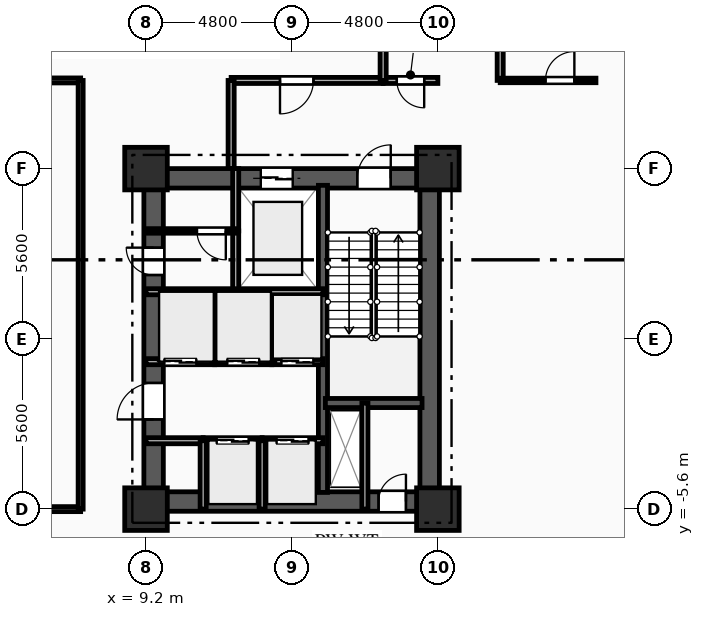
"""IFC4 building model, lengths in metres.
Left out: names, types, materials, properties, quantities, classifications, styles, units other than length and angle.
Written with IfcOpenShell. Run it as: python <this file> out.ifc"""

import sys

from ifc_helpers import new_model, si_unit, direction, frame, frame_2d, origin, origin_2d, place, context, subcontext, project, spatial, rectangle, extrude, element, fill, save


model = new_model("IFC4")
c1 = context("Model", 3, precision=1e-05, world=origin(), true_north=direction((0.0, 1.0)))
c2 = subcontext(c1, "Body", "Model", "MODEL_VIEW")
j1 = project(units=[si_unit("LENGTHUNIT", "METRE"), si_unit("PLANEANGLEUNIT", "RADIAN")], contexts=[c1])
p1 = place(None, origin())
s1 = spatial("IfcSite", under=j1, at=p1, CompositionType="ELEMENT")
p2 = place(p1, origin())
s2 = spatial("IfcBuilding", under=s1, at=p2, CompositionType="ELEMENT")
p3 = place(p2, origin())
s3 = spatial("IfcBuildingStorey", under=s2, at=p3, CompositionType="ELEMENT", Elevation=0.0)
for number, where, z_axis, x_axis in (
    (1, (9.2, -5.6, 0.0), (0.0, 0.0, 1.0), (1.0, 0.0, 0.0)),
    (2, (9.2, 5.6, 0.0), (0.0, 0.0, 1.0), (1.0, 0.0, 0.0)),
    (3, (18.8, -5.6, 0.0), (0.0, 0.0, 1.0), (1.0, 0.0, 0.0)),
    (4, (18.8, 5.6, 0.0), (0.0, 0.0, 1.0), (1.0, 0.0, 0.0)),
):
    element("IfcColumn", number, at=place(p3, frame(where, z_axis=z_axis, x_axis=x_axis)), inside=s3, PredefinedType="COLUMN", context=c2, shape_type="SweptSolid", body=[
        extrude(rectangle(XDim=1.4, YDim=1.4, at=origin_2d()), origin(), (0.0, 0.0, 1.0), 4.5),
    ])
p4 = place(p3, frame((9.2, 5.28, 0.0), z_axis=(0.0, 0.0, 1.0), x_axis=(1.0, 0.0, 0.0)))
e5 = element("IfcWall", 5, at=p4, inside=s3, PredefinedType="SHEAR", context=c2, shape_type="SweptSolid", body=[
    extrude(rectangle(XDim=9.6, YDim=0.64, at=frame_2d((4.8, 0.0))), origin(), (0.0, 0.0, 1.0), 4.17),
])
p5 = place(p4, frame((6.95, 0.0, 0.0)))
e6 = element("IfcOpeningElement", 6, at=p5, cuts=e5, PredefinedType="OPENING", context=c2, shape_type="SweptSolid", body=[
    extrude(rectangle(XDim=1.1, YDim=2.15, at=frame_2d((0.55, 1.075))), frame((0.0, 0.33, 0.0), z_axis=(0.0, -1.0, 0.0), x_axis=(1.0, 0.0, 0.0)), (0.0, 0.0, 1.0), 0.66),
])
p6 = place(p4, frame((3.775, 0.0, 0.0)))
e7 = element("IfcOpeningElement", 7, at=p6, cuts=e5, PredefinedType="OPENING", context=c2, shape_type="SweptSolid", body=[
    extrude(rectangle(XDim=1.05, YDim=2.1, at=frame_2d((0.525, 1.05))), frame((0.0, 0.33, 0.0), z_axis=(0.0, -1.0, 0.0), x_axis=(1.0, 0.0, 0.0)), (0.0, 0.0, 1.0), 0.66),
])
p7 = place(p3, frame((9.2, -5.35, 0.0), z_axis=(0.0, 0.0, 1.0), x_axis=(1.0, 0.0, 0.0)))
e8 = element("IfcWall", 8, at=p7, inside=s3, PredefinedType="SHEAR", context=c2, shape_type="SweptSolid", body=[
    extrude(rectangle(XDim=9.6, YDim=0.64, at=frame_2d((4.8, 0.0))), origin(), (0.0, 0.0, 1.0), 4.17),
])
p8 = place(p7, frame((7.65, 0.0, 0.0)))
e9 = element("IfcOpeningElement", 9, at=p8, cuts=e8, PredefinedType="OPENING", context=c2, shape_type="SweptSolid", body=[
    extrude(rectangle(XDim=0.9, YDim=2.1, at=frame_2d((0.45, 1.05))), frame((0.0, 0.33, 0.0), z_axis=(0.0, -1.0, 0.0), x_axis=(1.0, 0.0, 0.0)), (0.0, 0.0, 1.0), 0.66),
])
p9 = place(p3, frame((9.45, -5.05, 0.0), z_axis=(0.0, 0.0, 1.0), x_axis=(0.0, 1.0, 0.0)))
e10 = element("IfcWall", 10, at=p9, inside=s3, PredefinedType="SHEAR", context=c2, shape_type="SweptSolid", body=[
    extrude(rectangle(XDim=10.1, YDim=0.64, at=frame_2d((5.05, 0.0))), origin(), (0.0, 0.0, 1.0), 4.17),
])
p10 = place(p9, frame((7.15, 0.0, 0.0)))
e11 = element("IfcOpeningElement", 11, at=p10, cuts=e10, PredefinedType="OPENING", context=c2, shape_type="SweptSolid", body=[
    extrude(rectangle(XDim=0.9, YDim=2.1, at=frame_2d((0.45, 1.05))), frame((0.0, 0.33, 0.0), z_axis=(0.0, -1.0, 0.0), x_axis=(1.0, 0.0, 0.0)), (0.0, 0.0, 1.0), 0.66),
])
p11 = place(p9, frame((2.4, 0.0, 0.0)))
e12 = element("IfcOpeningElement", 12, at=p11, cuts=e10, PredefinedType="OPENING", context=c2, shape_type="SweptSolid", body=[
    extrude(rectangle(XDim=1.2, YDim=2.15, at=frame_2d((0.6, 1.075))), frame((0.0, 0.33, 0.0), z_axis=(0.0, -1.0, 0.0), x_axis=(1.0, 0.0, 0.0)), (0.0, 0.0, 1.0), 0.66),
])
p12 = place(p3, frame((18.53, -5.05, 0.0), z_axis=(0.0, 0.0, 1.0), x_axis=(0.0, 1.0, 0.0)))
e13 = element("IfcWall", 13, at=p12, inside=s3, PredefinedType="SHEAR", context=c2, shape_type="SweptSolid", body=[
    extrude(rectangle(XDim=10.1, YDim=0.64, at=frame_2d((5.05, 0.0))), origin(), (0.0, 0.0, 1.0), 4.17),
])
p13 = place(p3, frame((15.02, -5.05, 0.0), z_axis=(0.0, 0.0, 1.0), x_axis=(0.0, 1.0, 0.0)))
e14 = element("IfcWall", 14, at=p13, inside=s3, PredefinedType="SHEAR", context=c2, shape_type="SweptSolid", body=[
    extrude(rectangle(XDim=10.1, YDim=0.3, at=frame_2d((5.05, 0.0))), origin(), (0.0, 0.0, 1.0), 4.17),
])
p14 = place(p3, frame((15.1, -2.11, 0.0), z_axis=(0.0, 0.0, 1.0), x_axis=(1.0, 0.0, 0.0)))
e15 = element("IfcWall", 15, at=p14, inside=s3, PredefinedType="SHEAR", context=c2, shape_type="SweptSolid", body=[
    extrude(rectangle(XDim=3.18, YDim=0.3, at=frame_2d((1.59, 0.0))), origin(), (0.0, 0.0, 1.0), 4.17),
])
p15 = place(p3, frame((16.4, -2.11, 0.0), z_axis=(0.0, 0.0, 1.0), x_axis=(0.0, -1.0, 0.0)))
e16 = element("IfcWall", 16, at=p15, inside=s3, PredefinedType="PARTITIONING", context=c2, shape_type="SweptSolid", body=[
    extrude(rectangle(XDim=3.49, YDim=0.2, at=frame_2d((1.745, 0.0))), origin(), (0.0, 0.0, 1.0), 4.17),
])
p16 = place(p3, frame((12.15, 3.55, 0.0), z_axis=(0.0, 0.0, 1.0), x_axis=(0.0, -1.0, 0.0)))
e17 = element("IfcWall", 17, at=p16, inside=s3, PredefinedType="PARTITIONING", context=c2, shape_type="SweptSolid", body=[
    extrude(rectangle(XDim=2.0, YDim=0.2, at=frame_2d((1.0, 0.0))), origin(), (0.0, 0.0, 1.0), 4.17),
])
p17 = place(p3, frame((12.15, 5.6, 0.0), z_axis=(0.0, 0.0, 1.0), x_axis=(0.0, -1.0, 0.0)))
e18 = element("IfcWall", 18, at=p17, inside=s3, PredefinedType="PARTITIONING", context=c2, shape_type="SweptSolid", body=[
    extrude(rectangle(XDim=2.05, YDim=0.2, at=frame_2d((1.025, 0.0))), origin(), (0.0, 0.0, 1.0), 4.17),
])
p18 = place(p3, frame((18.8, 8.5, 0.0), z_axis=(0.0, 0.0, 1.0), x_axis=(-1.0, 0.0, 0.0)))
e19 = element("IfcWall", 19, at=p18, inside=s3, PredefinedType="PARTITIONING", context=c2, shape_type="SweptSolid", body=[
    extrude(rectangle(XDim=1.8, YDim=0.2, at=frame_2d((0.9, 0.0))), origin(), (0.0, 0.0, 1.0), 4.17),
])
p19 = place(p18, frame((0.45, 0.0, 0.0)))
e20 = element("IfcOpeningElement", 20, at=p19, cuts=e19, PredefinedType="OPENING", context=c2, shape_type="SweptSolid", body=[
    extrude(rectangle(XDim=0.9, YDim=2.1, at=frame_2d((0.45, 1.05))), frame((0.0, 0.11, 0.0), z_axis=(0.0, -1.0, 0.0), x_axis=(1.0, 0.0, 0.0)), (0.0, 0.0, 1.0), 0.22),
])
p20 = place(p3, frame((17.0, 8.5, 0.0), z_axis=(0.0, 0.0, 1.0), x_axis=(-1.0, 0.0, 0.0)))
e21 = element("IfcWall", 21, at=p20, inside=s3, PredefinedType="PARTITIONING", context=c2, shape_type="SweptSolid", body=[
    extrude(rectangle(XDim=5.0, YDim=0.2, at=frame_2d((2.5, 0.0))), origin(), (0.0, 0.0, 1.0), 4.17),
])
p21 = place(p20, frame((2.292, 0.0, 0.0)))
e22 = element("IfcOpeningElement", 22, at=p21, cuts=e21, PredefinedType="OPENING", context=c2, shape_type="SweptSolid", body=[
    extrude(rectangle(XDim=1.1, YDim=2.15, at=frame_2d((0.55, 1.075))), frame((0.0, 0.11, 0.0), z_axis=(0.0, -1.0, 0.0), x_axis=(1.0, 0.0, 0.0)), (0.0, 0.0, 1.0), 0.22),
])
p22 = place(p3, frame((12.0, 8.5, 0.0), z_axis=(0.0, 0.0, 1.0), x_axis=(0.0, -1.0, 0.0)))
e23 = element("IfcWall", 23, at=p22, inside=s3, PredefinedType="PARTITIONING", context=c2, shape_type="SweptSolid", body=[
    extrude(rectangle(XDim=2.9, YDim=0.2, at=frame_2d((1.45, 0.0))), origin(), (0.0, 0.0, 1.0), 4.17),
])
p23 = place(p3, frame((12.15, 3.55, 0.0), z_axis=(0.0, 0.0, 1.0), x_axis=(-1.0, 0.0, 0.0)))
e24 = element("IfcWall", 24, at=p23, inside=s3, PredefinedType="PARTITIONING", context=c2, shape_type="SweptSolid", body=[
    extrude(rectangle(XDim=2.95, YDim=0.15, at=frame_2d((1.475, 0.0))), origin(), (0.0, 0.0, 1.0), 4.17),
])
p24 = place(p23, frame((0.325, 0.0, 0.0)))
e25 = element("IfcOpeningElement", 25, at=p24, cuts=e24, PredefinedType="OPENING", context=c2, shape_type="SweptSolid", body=[
    extrude(rectangle(XDim=0.95, YDim=2.1, at=frame_2d((0.475, 1.05))), frame((0.0, 0.085, 0.0), z_axis=(0.0, -1.0, 0.0), x_axis=(1.0, 0.0, 0.0)), (0.0, 0.0, 1.0), 0.17),
])
p25 = place(p3, frame((9.2, -3.35, 0.0), z_axis=(0.0, 0.0, 1.0), x_axis=(1.0, 0.0, 0.0)))
e26 = element("IfcWall", 26, at=p25, inside=s3, PredefinedType="PARTITIONING", context=c2, shape_type="SweptSolid", body=[
    extrude(rectangle(XDim=1.88, YDim=0.2, at=frame_2d((0.94, 0.0))), origin(), (0.0, 0.0, 1.0), 3.885),
])
p26 = place(p3, frame((11.08, -3.35, 0.0), z_axis=(0.0, 0.0, 1.0), x_axis=(1.0, 0.0, 0.0)))
e27 = element("IfcWall", 27, at=p26, inside=s3, PredefinedType="PARTITIONING", context=c2, shape_type="SweptSolid", body=[
    extrude(rectangle(XDim=1.94, YDim=0.2, at=frame_2d((0.97, 0.0))), origin(), (0.0, 0.0, 1.0), 4.17),
])
p27 = place(p26, frame((0.445, 0.0, 0.0)))
e28 = element("IfcOpeningElement", 28, at=p27, cuts=e27, PredefinedType="OPENING", context=c2, shape_type="SweptSolid", body=[
    extrude(rectangle(XDim=1.05, YDim=2.1, at=frame_2d((0.525, 1.05))), frame((0.0, 0.11, 0.0), z_axis=(0.0, -1.0, 0.0), x_axis=(1.0, 0.0, 0.0)), (0.0, 0.0, 1.0), 0.22),
])
p28 = place(p3, frame((13.02, -3.35, 0.0), z_axis=(0.0, 0.0, 1.0), x_axis=(1.0, 0.0, 0.0)))
e29 = element("IfcWall", 29, at=p28, inside=s3, PredefinedType="PARTITIONING", context=c2, shape_type="SweptSolid", body=[
    extrude(rectangle(XDim=2.0, YDim=0.2, at=frame_2d((1.0, 0.0))), origin(), (0.0, 0.0, 1.0), 4.17),
])
p29 = place(p28, frame((0.475, 0.0, 0.0)))
e30 = element("IfcOpeningElement", 30, at=p29, cuts=e29, PredefinedType="OPENING", context=c2, shape_type="SweptSolid", body=[
    extrude(rectangle(XDim=1.05, YDim=2.1, at=frame_2d((0.525, 1.05))), frame((0.0, 0.11, 0.0), z_axis=(0.0, -1.0, 0.0), x_axis=(1.0, 0.0, 0.0)), (0.0, 0.0, 1.0), 0.22),
])
p30 = place(p3, frame((11.46, -0.75, 0.0), z_axis=(0.0, 0.0, 1.0), x_axis=(-1.0, 0.0, 0.0)))
e31 = element("IfcWall", 31, at=p30, inside=s3, PredefinedType="PARTITIONING", context=c2, shape_type="SweptSolid", body=[
    extrude(rectangle(XDim=2.26, YDim=0.2, at=frame_2d((1.13, 0.0))), origin(), (0.0, 0.0, 1.0), 4.17),
])
p31 = place(p30, frame((0.605, 0.0, 0.0)))
e32 = element("IfcOpeningElement", 32, at=p31, cuts=e31, PredefinedType="OPENING", context=c2, shape_type="SweptSolid", body=[
    extrude(rectangle(XDim=1.05, YDim=2.1, at=frame_2d((0.525, 1.05))), frame((0.0, 0.11, 0.0), z_axis=(0.0, -1.0, 0.0), x_axis=(1.0, 0.0, 0.0)), (0.0, 0.0, 1.0), 0.22),
])
p32 = place(p3, frame((13.34, -0.75, 0.0), z_axis=(0.0, 0.0, 1.0), x_axis=(-1.0, 0.0, 0.0)))
e33 = element("IfcWall", 33, at=p32, inside=s3, PredefinedType="PARTITIONING", context=c2, shape_type="SweptSolid", body=[
    extrude(rectangle(XDim=1.88, YDim=0.2, at=frame_2d((0.94, 0.0))), origin(), (0.0, 0.0, 1.0), 4.17),
])
p33 = place(p32, frame((0.415, 0.0, 0.0)))
e34 = element("IfcOpeningElement", 34, at=p33, cuts=e33, PredefinedType="OPENING", context=c2, shape_type="SweptSolid", body=[
    extrude(rectangle(XDim=1.05, YDim=2.1, at=frame_2d((0.525, 1.05))), frame((0.0, 0.11, 0.0), z_axis=(0.0, -1.0, 0.0), x_axis=(1.0, 0.0, 0.0)), (0.0, 0.0, 1.0), 0.22),
])
p34 = place(p3, frame((15.02, -0.75, 0.0), z_axis=(0.0, 0.0, 1.0), x_axis=(-1.0, 0.0, 0.0)))
e35 = element("IfcWall", 35, at=p34, inside=s3, PredefinedType="PARTITIONING", context=c2, shape_type="SweptSolid", body=[
    extrude(rectangle(XDim=1.68, YDim=0.2, at=frame_2d((0.84, 0.0))), origin(), (0.0, 0.0, 1.0), 4.17),
])
p35 = place(p34, frame((0.315, 0.0, 0.0)))
e36 = element("IfcOpeningElement", 36, at=p35, cuts=e35, PredefinedType="OPENING", context=c2, shape_type="SweptSolid", body=[
    extrude(rectangle(XDim=1.05, YDim=2.1, at=frame_2d((0.525, 1.05))), frame((0.0, 0.11, 0.0), z_axis=(0.0, -1.0, 0.0), x_axis=(1.0, 0.0, 0.0)), (0.0, 0.0, 1.0), 0.22),
])
for number, where, z_axis, x_axis in (
    (37, (11.08, -5.6, 0.0), (0.0, 0.0, 1.0), (0.0, 1.0, 0.0)),
    (38, (13.02, -5.6, 0.0), (0.0, 0.0, 1.0), (0.0, 1.0, 0.0)),
):
    element("IfcWall", number, at=place(p3, frame(where, z_axis=z_axis, x_axis=x_axis)), inside=s3, PredefinedType="PARTITIONING", context=c2, shape_type="SweptSolid", body=[
        extrude(rectangle(XDim=2.25, YDim=0.2, at=frame_2d((1.125, 0.0))), origin(), (0.0, 0.0, 1.0), 4.17),
    ])
for number, where, z_axis, x_axis in (
    (39, (11.46, -0.75, 0.0), (0.0, 0.0, 1.0), (0.0, 1.0, 0.0)),
    (40, (13.34, -0.75, 0.0), (0.0, 0.0, 1.0), (0.0, 1.0, 0.0)),
):
    element("IfcWall", number, at=place(p3, frame(where, z_axis=z_axis, x_axis=x_axis)), inside=s3, PredefinedType="PARTITIONING", context=c2, shape_type="SweptSolid", body=[
        extrude(rectangle(XDim=2.3, YDim=0.2, at=frame_2d((1.15, 0.0))), origin(), (0.0, 0.0, 1.0), 4.17),
    ])
p36 = place(p3, frame((17.0, 8.5, 0.0), z_axis=(0.0, 0.0, 1.0), x_axis=(0.0, 1.0, 0.0)))
e41 = element("IfcWall", 41, at=p36, inside=s3, PredefinedType="PARTITIONING", context=c2, shape_type="SweptSolid", body=[
    extrude(rectangle(XDim=2.15, YDim=0.2, at=frame_2d((1.075, 0.0))), origin(), (0.0, 0.0, 1.0), 4.17),
])
p37 = place(p3, frame((20.85, 24.8, 0.0), z_axis=(0.0, 0.0, 1.0), x_axis=(0.0, -1.0, 0.0)))
e42 = element("IfcWall", 42, at=p37, inside=s3, PredefinedType="PARTITIONING", context=c2, shape_type="SweptSolid", body=[
    extrude(rectangle(XDim=16.3, YDim=0.2, at=frame_2d((8.15, 0.0))), origin(), (0.0, 0.0, 1.0), 4.17),
])
p38 = place(p3, frame((7.05, 8.5, 0.0), z_axis=(0.0, 0.0, 1.0), x_axis=(-1.0, 0.0, 0.0)))
e43 = element("IfcWall", 43, at=p38, inside=s3, PredefinedType="PARTITIONING", context=c2, shape_type="SweptSolid", body=[
    extrude(rectangle(XDim=7.05, YDim=0.165, at=frame_2d((3.525, 0.0))), origin(), (0.0, 0.0, 1.0), 4.17),
])
p39 = place(p3, frame((0.0, -5.6, 0.0), z_axis=(0.0, 0.0, 1.0), x_axis=(1.0, 0.0, 0.0)))
e44 = element("IfcWall", 44, at=p39, inside=s3, PredefinedType="PARTITIONING", context=c2, shape_type="SweptSolid", body=[
    extrude(rectangle(XDim=7.05, YDim=0.165, at=frame_2d((3.525, 0.0))), origin(), (0.0, 0.0, 1.0), 3.655),
])
p40 = place(p3, frame((7.05, -5.6, 0.0), z_axis=(0.0, 0.0, 1.0), x_axis=(0.0, 1.0, 0.0)))
e45 = element("IfcWall", 45, at=p40, inside=s3, PredefinedType="PARTITIONING", context=c2, shape_type="SweptSolid", body=[
    extrude(rectangle(XDim=14.1, YDim=0.165, at=frame_2d((7.05, 0.0))), origin(), (0.0, 0.0, 1.0), 4.17),
])
p41 = place(p3, frame((20.85, 8.5, 0.0), z_axis=(0.0, 0.0, 1.0), x_axis=(1.0, 0.0, 0.0)))
e46 = element("IfcWall", 46, at=p41, inside=s3, PredefinedType="PARTITIONING", context=c2, shape_type="SweptSolid", body=[
    extrude(rectangle(XDim=3.15, YDim=0.15, at=frame_2d((1.575, 0.0))), origin(), (0.0, 0.0, 1.0), 4.17),
])
p42 = place(p41, frame((1.49, 0.0, 0.0)))
e47 = element("IfcOpeningElement", 47, at=p42, cuts=e46, PredefinedType="OPENING", context=c2, shape_type="SweptSolid", body=[
    extrude(rectangle(XDim=0.95, YDim=2.1, at=frame_2d((0.475, 1.05))), frame((0.0, 0.085, 0.0), z_axis=(0.0, -1.0, 0.0), x_axis=(1.0, 0.0, 0.0)), (0.0, 0.0, 1.0), 0.17),
])
p43 = place(p3, frame((9.2, 1.55, 0.0), z_axis=(0.0, 0.0, 1.0), x_axis=(1.0, 0.0, 0.0)))
e48 = element("IfcWall", 48, at=p43, inside=s3, PredefinedType="PARTITIONING", context=c2, shape_type="SweptSolid", body=[
    extrude(rectangle(XDim=5.82, YDim=0.2, at=frame_2d((2.91, 0.0))), origin(), (0.0, 0.0, 1.0), 4.17),
])
p44 = place(p5, origin())
e49 = element("IfcDoor", 49, at=p44, inside=s3, OperationType="SINGLE_SWING_RIGHT", PredefinedType="DOOR", context=c2, shape_type="SweptSolid", body=[
    extrude(rectangle(XDim=1.1, YDim=2.15, at=frame_2d((0.55, 1.075))), frame((0.0, 0.025, 0.0), z_axis=(0.0, -1.0, 0.0), x_axis=(1.0, 0.0, 0.0)), (0.0, 0.0, 1.0), 0.05),
])
fill(e6, e49)
p45 = place(p6, origin())
e50 = element("IfcDoor", 50, at=p45, inside=s3, OperationType="DOUBLE_DOOR_SLIDING", PredefinedType="DOOR", context=c2, shape_type="SweptSolid", body=[
    extrude(rectangle(XDim=1.05, YDim=2.1, at=frame_2d((0.525, 1.05))), frame((0.0, 0.025, 0.0), z_axis=(0.0, -1.0, 0.0), x_axis=(1.0, 0.0, 0.0)), (0.0, 0.0, 1.0), 0.05),
])
fill(e7, e50)
p46 = place(p8, origin())
e51 = element("IfcDoor", 51, at=p46, inside=s3, OperationType="SINGLE_SWING_RIGHT", PredefinedType="DOOR", context=c2, shape_type="SweptSolid", body=[
    extrude(rectangle(XDim=0.9, YDim=2.1, at=frame_2d((0.45, 1.05))), frame((0.0, 0.025, 0.0), z_axis=(0.0, -1.0, 0.0), x_axis=(1.0, 0.0, 0.0)), (0.0, 0.0, 1.0), 0.05),
])
fill(e9, e51)
p47 = place(p19, origin())
e52 = element("IfcDoor", 52, at=p47, inside=s3, OperationType="SINGLE_SWING_LEFT", PredefinedType="DOOR", context=c2, shape_type="SweptSolid", body=[
    extrude(rectangle(XDim=0.9, YDim=2.1, at=frame_2d((0.45, 1.05))), frame((0.0, 0.025, 0.0), z_axis=(0.0, -1.0, 0.0), x_axis=(1.0, 0.0, 0.0)), (0.0, 0.0, 1.0), 0.05),
])
fill(e20, e52)
p48 = place(p21, origin())
e53 = element("IfcDoor", 53, at=p48, inside=s3, OperationType="SINGLE_SWING_RIGHT", PredefinedType="DOOR", context=c2, shape_type="SweptSolid", body=[
    extrude(rectangle(XDim=1.1, YDim=2.15, at=frame_2d((0.55, 1.075))), frame((0.0, 0.025, 0.0), z_axis=(0.0, -1.0, 0.0), x_axis=(1.0, 0.0, 0.0)), (0.0, 0.0, 1.0), 0.05),
])
fill(e22, e53)
p49 = place(p24, origin())
e54 = element("IfcDoor", 54, at=p49, inside=s3, OperationType="SINGLE_SWING_LEFT", PredefinedType="DOOR", context=c2, shape_type="SweptSolid", body=[
    extrude(rectangle(XDim=0.95, YDim=2.1, at=frame_2d((0.475, 1.05))), frame((0.0, 0.025, 0.0), z_axis=(0.0, -1.0, 0.0), x_axis=(1.0, 0.0, 0.0)), (0.0, 0.0, 1.0), 0.05),
])
fill(e25, e54)
p50 = place(p10, origin())
e55 = element("IfcDoor", 55, at=p50, inside=s3, OperationType="SINGLE_SWING_RIGHT", PredefinedType="DOOR", context=c2, shape_type="SweptSolid", body=[
    extrude(rectangle(XDim=0.9, YDim=2.1, at=frame_2d((0.45, 1.05))), frame((0.0, 0.025, 0.0), z_axis=(0.0, -1.0, 0.0), x_axis=(1.0, 0.0, 0.0)), (0.0, 0.0, 1.0), 0.05),
])
fill(e11, e55)
p51 = place(p27, origin())
e56 = element("IfcDoor", 56, at=p51, inside=s3, OperationType="DOUBLE_DOOR_SLIDING", PredefinedType="DOOR", context=c2, shape_type="SweptSolid", body=[
    extrude(rectangle(XDim=1.05, YDim=2.1, at=frame_2d((0.525, 1.05))), frame((0.0, 0.025, 0.0), z_axis=(0.0, -1.0, 0.0), x_axis=(1.0, 0.0, 0.0)), (0.0, 0.0, 1.0), 0.05),
])
fill(e28, e56)
p52 = place(p29, origin())
e57 = element("IfcDoor", 57, at=p52, inside=s3, OperationType="DOUBLE_DOOR_SLIDING", PredefinedType="DOOR", context=c2, shape_type="SweptSolid", body=[
    extrude(rectangle(XDim=1.05, YDim=2.1, at=frame_2d((0.525, 1.05))), frame((0.0, 0.025, 0.0), z_axis=(0.0, -1.0, 0.0), x_axis=(1.0, 0.0, 0.0)), (0.0, 0.0, 1.0), 0.05),
])
fill(e30, e57)
p53 = place(p31, origin())
e58 = element("IfcDoor", 58, at=p53, inside=s3, OperationType="DOUBLE_DOOR_SLIDING", PredefinedType="DOOR", context=c2, shape_type="SweptSolid", body=[
    extrude(rectangle(XDim=1.05, YDim=2.1, at=frame_2d((0.525, 1.05))), frame((0.0, 0.025, 0.0), z_axis=(0.0, -1.0, 0.0), x_axis=(1.0, 0.0, 0.0)), (0.0, 0.0, 1.0), 0.05),
])
fill(e32, e58)
p54 = place(p33, origin())
e59 = element("IfcDoor", 59, at=p54, inside=s3, OperationType="DOUBLE_DOOR_SLIDING", PredefinedType="DOOR", context=c2, shape_type="SweptSolid", body=[
    extrude(rectangle(XDim=1.05, YDim=2.1, at=frame_2d((0.525, 1.05))), frame((0.0, 0.025, 0.0), z_axis=(0.0, -1.0, 0.0), x_axis=(1.0, 0.0, 0.0)), (0.0, 0.0, 1.0), 0.05),
])
fill(e34, e59)
p55 = place(p35, origin())
e60 = element("IfcDoor", 60, at=p55, inside=s3, OperationType="DOUBLE_DOOR_SLIDING", PredefinedType="DOOR", context=c2, shape_type="SweptSolid", body=[
    extrude(rectangle(XDim=1.05, YDim=2.1, at=frame_2d((0.525, 1.05))), frame((0.0, 0.025, 0.0), z_axis=(0.0, -1.0, 0.0), x_axis=(1.0, 0.0, 0.0)), (0.0, 0.0, 1.0), 0.05),
])
fill(e36, e60)
p56 = place(p11, origin())
e61 = element("IfcDoor", 61, at=p56, inside=s3, OperationType="SINGLE_SWING_LEFT", PredefinedType="DOOR", context=c2, shape_type="SweptSolid", body=[
    extrude(rectangle(XDim=1.2, YDim=2.15, at=frame_2d((0.6, 1.075))), frame((0.0, 0.025, 0.0), z_axis=(0.0, -1.0, 0.0), x_axis=(1.0, 0.0, 0.0)), (0.0, 0.0, 1.0), 0.05),
])
fill(e12, e61)
p57 = place(p42, origin())
e62 = element("IfcDoor", 62, at=p57, inside=s3, OperationType="SINGLE_SWING_RIGHT", PredefinedType="DOOR", context=c2, shape_type="SweptSolid", body=[
    extrude(rectangle(XDim=0.95, YDim=2.1, at=frame_2d((0.475, 1.05))), frame((0.0, 0.025, 0.0), z_axis=(0.0, -1.0, 0.0), x_axis=(1.0, 0.0, 0.0)), (0.0, 0.0, 1.0), 0.05),
])
fill(e47, e62)
save(model, sys.argv[1])
